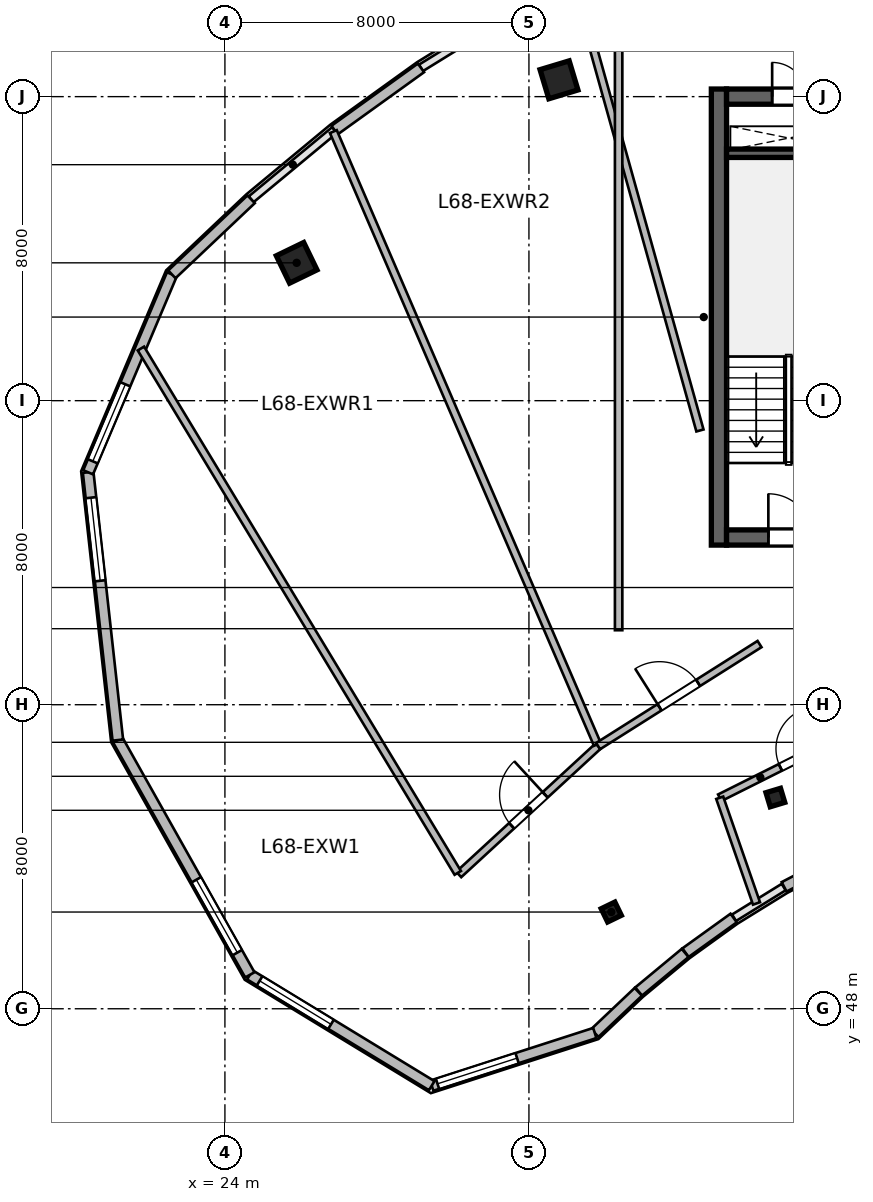
"""IFC4 building model, lengths in metres.
Left out: names, types, materials, properties, quantities, classifications, styles, units other than length and angle.
Written with IfcOpenShell. Run it as: python <this file> out.ifc"""

import sys

from ifc_helpers import new_model, si_unit, direction, frame, frame_2d, origin, origin_2d, place, context, subcontext, project, spatial, rectangle, i_section, extrude, source, transform, mapped, element, fill, save


model = new_model("IFC4")
c1 = context("Model", 3, precision=1e-05, world=origin(), true_north=direction((0.0, 1.0)))
c2 = subcontext(c1, "Body", "Model", "MODEL_VIEW")
j1 = project(units=[si_unit("LENGTHUNIT", "METRE"), si_unit("PLANEANGLEUNIT", "RADIAN")], contexts=[c1])
p1 = place(None, origin())
s1 = spatial("IfcSite", under=j1, at=p1, CompositionType="ELEMENT")
p2 = place(p1, origin())
s2 = spatial("IfcBuilding", under=s1, at=p2, CompositionType="ELEMENT")
p3 = place(p2, frame((0.0, 0.0, 279.6)))
s3 = spatial("IfcBuildingStorey", under=s2, at=p3, CompositionType="ELEMENT", Elevation=279.6)
m1 = source(origin(), c2, "Body", "SweptSolid", [
    extrude(rectangle(XDim=12.0, YDim=0.4, at=frame_2d((6.0, 0.0))), origin(), (0.0, 0.0, 1.0), 3.9),
])
p4 = place(p3, frame((37.0, 60.2, 0.0), z_axis=(0.0, 0.0, 1.0), x_axis=(0.0, 1.0, 0.0)))
e1 = element("IfcWall", 1, at=p4, inside=s3, PredefinedType="SHEAR", context=c2, shape_type="MappedRepresentation", body=[
    mapped(m1, transform((0.0, 0.0, 0.0), scale=1.0)),
])
m2 = source(origin(), c2, "Body", "SweptSolid", [
    extrude(rectangle(XDim=21.6, YDim=0.4, at=frame_2d((10.8, 0.0))), origin(), (0.0, 0.0, 1.0), 3.9),
])
p5 = place(p3, frame((37.2, 60.4, 0.0), z_axis=(0.0, 0.0, 1.0), x_axis=(1.0, 0.0, 0.0)))
e2 = element("IfcWall", 2, at=p5, inside=s3, PredefinedType="SHEAR", context=c2, shape_type="MappedRepresentation", body=[
    mapped(m2, transform((0.0, 0.0, 0.0), scale=1.0)),
])
p6 = place(p5, frame((1.1, 0.0, 0.0)))
e3 = element("IfcOpeningElement", 3, at=p6, cuts=e2, PredefinedType="OPENING", context=c2, shape_type="SweptSolid", body=[
    extrude(rectangle(XDim=1.15, YDim=2.15, at=frame_2d((0.575, 1.075))), frame((0.0, 0.21, 0.0), z_axis=(0.0, -1.0, 0.0), x_axis=(1.0, 0.0, 0.0)), (0.0, 0.0, 1.0), 0.42),
])
p7 = place(p5, frame((19.5, 0.0, 0.0)))
e4 = element("IfcOpeningElement", 4, at=p7, cuts=e2, PredefinedType="OPENING", context=c2, shape_type="SweptSolid", body=[
    extrude(rectangle(XDim=0.9, YDim=2.1, at=frame_2d((0.45, 1.05))), frame((0.0, 0.21, 0.0), z_axis=(0.0, -1.0, 0.0), x_axis=(1.0, 0.0, 0.0)), (0.0, 0.0, 1.0), 0.42),
])
p8 = place(p5, frame((12.02, 0.0, 0.0)))
e5 = element("IfcOpeningElement", 5, at=p8, cuts=e2, PredefinedType="OPENING", context=c2, shape_type="SweptSolid", body=[
    extrude(rectangle(XDim=1.6, YDim=2.15, at=frame_2d((0.8, 1.075))), frame((0.0, 0.21, 0.0), z_axis=(0.0, -1.0, 0.0), x_axis=(1.0, 0.0, 0.0)), (0.0, 0.0, 1.0), 0.42),
])
p9 = place(p3, frame((37.2, 72.0, 0.0), z_axis=(0.0, 0.0, 1.0), x_axis=(1.0, 0.0, 0.0)))
e6 = element("IfcWall", 6, at=p9, inside=s3, PredefinedType="SHEAR", context=c2, shape_type="MappedRepresentation", body=[
    mapped(m2, transform((0.0, 0.0, 0.0), scale=1.0)),
])
p10 = place(p9, frame((1.2, 0.0, 0.0)))
e7 = element("IfcOpeningElement", 7, at=p10, cuts=e6, PredefinedType="OPENING", context=c2, shape_type="SweptSolid", body=[
    extrude(rectangle(XDim=0.9, YDim=2.1, at=frame_2d((0.45, 1.05))), frame((0.0, 0.21, 0.0), z_axis=(0.0, -1.0, 0.0), x_axis=(1.0, 0.0, 0.0)), (0.0, 0.0, 1.0), 0.42),
])
p11 = place(p9, frame((14.7, 0.0, 0.0)))
e8 = element("IfcOpeningElement", 8, at=p11, cuts=e6, PredefinedType="OPENING", context=c2, shape_type="SweptSolid", body=[
    extrude(rectangle(XDim=1.2, YDim=2.15, at=frame_2d((0.6, 1.075))), frame((0.0, 0.21, 0.0), z_axis=(0.0, -1.0, 0.0), x_axis=(1.0, 0.0, 0.0)), (0.0, 0.0, 1.0), 0.42),
])
p12 = place(p9, frame((4.15, 0.0, 0.0)))
e9 = element("IfcOpeningElement", 9, at=p12, cuts=e6, PredefinedType="OPENING", context=c2, shape_type="SweptSolid", body=[
    extrude(rectangle(XDim=1.3, YDim=2.15, at=frame_2d((0.65, 1.075))), frame((0.0, 0.21, 0.0), z_axis=(0.0, -1.0, 0.0), x_axis=(1.0, 0.0, 0.0)), (0.0, 0.0, 1.0), 0.42),
])
p13 = place(p9, frame((7.25, 0.0, 0.0)))
e10 = element("IfcOpeningElement", 10, at=p13, cuts=e6, PredefinedType="OPENING", context=c2, shape_type="SweptSolid", body=[
    extrude(rectangle(XDim=0.9, YDim=2.1, at=frame_2d((0.45, 1.05))), frame((0.0, 0.21, 0.0), z_axis=(0.0, -1.0, 0.0), x_axis=(1.0, 0.0, 0.0)), (0.0, 0.0, 1.0), 0.42),
])
m3 = source(origin(), c2, "Body", "SweptSolid", [
    extrude(rectangle(XDim=3.27, YDim=0.22, at=frame_2d((1.635, 0.0))), origin(), (0.0, 0.0, 1.0), 3.9),
])
p14 = place(p3, frame((37.2, 70.51, 0.0), z_axis=(0.0, 0.0, 1.0), x_axis=(1.0, 0.0, 0.0)))
e11 = element("IfcWall", 11, at=p14, inside=s3, PredefinedType="SHEAR", context=c2, shape_type="MappedRepresentation", body=[
    mapped(m3, transform((0.0, 0.0, 0.0), scale=1.0)),
])
m4 = source(origin(), c2, "Body", "SweptSolid", [
    extrude(i_section(OverallWidth=0.399, OverallDepth=0.387, WebThickness=0.021, FlangeThickness=0.033, at=origin_2d()), origin(), (0.0, 0.0, 1.0), 3.9),
])
p15 = place(p3, frame((34.166, 50.545, 0.0), z_axis=(0.0, 0.0, 1.0), x_axis=(-0.436173672171, 0.899862504889, 0.0)))
e12 = element("IfcColumn", 12, at=p15, inside=s3, PredefinedType="COLUMN", context=c2, shape_type="MappedRepresentation", body=[
    mapped(m4, transform((0.0, 0.0, 0.0), scale=1.0)),
])
m5 = source(origin(), c2, "Body", "SweptSolid", [
    extrude(rectangle(XDim=0.8, YDim=0.8, at=origin_2d()), origin(), (0.0, 0.0, 1.0), 3.9),
])
p16 = place(p3, frame((25.888, 67.627, 0.0), z_axis=(0.0, 0.0, 1.0), x_axis=(-0.436173672171, 0.899862504889, 0.0)))
e13 = element("IfcColumn", 13, at=p16, inside=s3, PredefinedType="COLUMN", context=c2, shape_type="MappedRepresentation", body=[
    mapped(m5, transform((0.0, 0.0, 0.0), scale=1.0)),
])
p17 = place(p3, frame((38.485, 53.558, 0.0), z_axis=(0.0, 0.0, 1.0), x_axis=(-0.288697611798, 0.957420330337, 0.0)))
e14 = element("IfcColumn", 14, at=p17, inside=s3, PredefinedType="COLUMN", context=c2, shape_type="MappedRepresentation", body=[
    mapped(m4, transform((0.0, 0.0, 0.0), scale=1.0)),
])
p18 = place(p3, frame((32.791, 72.442, 0.0), z_axis=(0.0, 0.0, 1.0), x_axis=(-0.288697611798, 0.957420330337, 0.0)))
e15 = element("IfcColumn", 15, at=p18, inside=s3, PredefinedType="COLUMN", context=c2, shape_type="MappedRepresentation", body=[
    mapped(m5, transform((0.0, 0.0, 0.0), scale=1.0)),
])
m6 = source(origin(), c2, "Body", "SweptSolid", [
    extrude(rectangle(XDim=1.512, YDim=0.28, at=frame_2d((0.756, 0.0))), origin(), (0.0, 0.0, 1.0), 3.64),
])
p19 = place(p3, frame((40.056, 51.906, 0.0), z_axis=(0.0, 0.0, 1.0), x_axis=(-0.886841011195, -0.462074691865, 0.0)))
e16 = element("IfcWall", 16, at=p19, inside=s3, PredefinedType="SOLIDWALL", context=c2, shape_type="MappedRepresentation", body=[
    mapped(m6, transform((0.0, 0.0, 0.0), scale=1.0)),
])
m7 = source(origin(), c2, "Body", "SweptSolid", [
    extrude(rectangle(XDim=1.561, YDim=0.28, at=frame_2d((0.781, 0.0))), origin(), (0.0, 0.0, 1.0), 3.64),
])
p20 = place(p3, frame((37.387, 50.387, 0.0), z_axis=(0.0, 0.0, 1.0), x_axis=(-0.81154027425, -0.584296485758, 0.0)))
e17 = element("IfcWall", 17, at=p20, inside=s3, PredefinedType="SOLIDWALL", context=c2, shape_type="MappedRepresentation", body=[
    mapped(m7, transform((0.0, 0.0, 0.0), scale=1.0)),
])
m8 = source(origin(), c2, "Body", "SweptSolid", [
    extrude(rectangle(XDim=1.589, YDim=0.28, at=frame_2d((0.794, 0.0))), origin(), (0.0, 0.0, 1.0), 3.64),
])
p21 = place(p3, frame((36.11, 49.468, 0.0), z_axis=(0.0, 0.0, 1.0), x_axis=(-0.769805836273, -0.63827813251, 0.0)))
e18 = element("IfcWall", 18, at=p21, inside=s3, PredefinedType="SOLIDWALL", context=c2, shape_type="MappedRepresentation", body=[
    mapped(m8, transform((0.0, 0.0, 0.0), scale=1.0)),
])
m9 = source(origin(), c2, "Body", "SweptSolid", [
    extrude(rectangle(XDim=1.577, YDim=0.28, at=frame_2d((0.789, 0.0))), origin(), (0.0, 0.0, 1.0), 3.64),
])
p22 = place(p3, frame((34.878, 48.446, 0.0), z_axis=(0.0, 0.0, 1.0), x_axis=(-0.726119464467, -0.687568558998, 0.0)))
e19 = element("IfcWall", 19, at=p22, inside=s3, PredefinedType="SOLIDWALL", context=c2, shape_type="MappedRepresentation", body=[
    mapped(m9, transform((0.0, 0.0, 0.0), scale=1.0)),
])
m10 = source(origin(), c2, "Body", "SweptSolid", [
    extrude(rectangle(XDim=4.509, YDim=0.28, at=frame_2d((2.255, 0.0))), origin(), (0.0, 0.0, 1.0), 3.64),
])
p23 = place(p3, frame((33.733, 47.361, 0.0), z_axis=(0.0, 0.0, 1.0), x_axis=(-0.95162949292, -0.307247958828, 0.0)))
e20 = element("IfcWall", 20, at=p23, inside=s3, PredefinedType="SOLIDWALL", context=c2, shape_type="MappedRepresentation", body=[
    mapped(m10, transform((0.0, 0.0, 0.0), scale=1.0)),
])
p24 = place(p23, frame((2.149, 0.0, 0.95)))
e21 = element("IfcOpeningElement", 21, at=p24, cuts=e20, PredefinedType="OPENING", context=c2, shape_type="SweptSolid", body=[
    extrude(rectangle(XDim=2.2, YDim=2.1, at=frame_2d((1.1, 1.05))), frame((0.0, 0.15, 0.0), z_axis=(0.0, -1.0, 0.0), x_axis=(1.0, 0.0, 0.0)), (0.0, 0.0, 1.0), 0.3),
])
m11 = source(origin(), c2, "Body", "SweptSolid", [
    extrude(rectangle(XDim=5.604, YDim=0.28, at=frame_2d((2.802, 0.0))), origin(), (0.0, 0.0, 1.0), 3.64),
])
p25 = place(p3, frame((29.442, 45.976, 0.0), z_axis=(0.0, 0.0, 1.0), x_axis=(-0.854002492971, 0.520268913158, 0.0)))
e22 = element("IfcWall", 22, at=p25, inside=s3, PredefinedType="SOLIDWALL", context=c2, shape_type="MappedRepresentation", body=[
    mapped(m11, transform((0.0, 0.0, 0.0), scale=1.0)),
])
p26 = place(p25, frame((3.103, 0.0, 0.95)))
e23 = element("IfcOpeningElement", 23, at=p26, cuts=e22, PredefinedType="OPENING", context=c2, shape_type="SweptSolid", body=[
    extrude(rectangle(XDim=2.2, YDim=2.1, at=frame_2d((1.1, 1.05))), frame((0.0, 0.15, 0.0), z_axis=(0.0, -1.0, 0.0), x_axis=(1.0, 0.0, 0.0)), (0.0, 0.0, 1.0), 0.3),
])
m12 = source(origin(), c2, "Body", "SweptSolid", [
    extrude(rectangle(XDim=7.087, YDim=0.28, at=frame_2d((3.543, 0.0))), origin(), (0.0, 0.0, 1.0), 3.64),
])
p27 = place(p3, frame((24.656, 48.892, 0.0), z_axis=(0.0, 0.0, 1.0), x_axis=(-0.490158199368, 0.871633489256, 0.0)))
e24 = element("IfcWall", 24, at=p27, inside=s3, PredefinedType="SOLIDWALL", context=c2, shape_type="MappedRepresentation", body=[
    mapped(m12, transform((0.0, 0.0, 0.0), scale=1.0)),
])
p28 = place(p27, frame((0.672, 0.0, 0.95)))
e25 = element("IfcOpeningElement", 25, at=p28, cuts=e24, PredefinedType="OPENING", context=c2, shape_type="SweptSolid", body=[
    extrude(rectangle(XDim=2.2, YDim=2.1, at=frame_2d((1.1, 1.05))), frame((0.0, 0.15, 0.0), z_axis=(0.0, -1.0, 0.0), x_axis=(1.0, 0.0, 0.0)), (0.0, 0.0, 1.0), 0.3),
])
m13 = source(origin(), c2, "Body", "SweptSolid", [
    extrude(rectangle(XDim=7.09, YDim=0.28, at=frame_2d((3.545, 0.0))), origin(), (0.0, 0.0, 1.0), 3.64),
])
p29 = place(p3, frame((21.182, 55.069, 0.0), z_axis=(0.0, 0.0, 1.0), x_axis=(-0.110159396922, 0.993913933532, 0.0)))
e26 = element("IfcWall", 26, at=p29, inside=s3, PredefinedType="SOLIDWALL", context=c2, shape_type="MappedRepresentation", body=[
    mapped(m13, transform((0.0, 0.0, 0.0), scale=1.0)),
])
p30 = place(p29, frame((4.217, 0.0, 0.95)))
e27 = element("IfcOpeningElement", 27, at=p30, cuts=e26, PredefinedType="OPENING", context=c2, shape_type="SweptSolid", body=[
    extrude(rectangle(XDim=2.2, YDim=2.1, at=frame_2d((1.1, 1.05))), frame((0.0, 0.15, 0.0), z_axis=(0.0, -1.0, 0.0), x_axis=(1.0, 0.0, 0.0)), (0.0, 0.0, 1.0), 0.3),
])
m14 = source(origin(), c2, "Body", "SweptSolid", [
    extrude(rectangle(XDim=5.655, YDim=0.28, at=frame_2d((2.828, 0.0))), origin(), (0.0, 0.0, 1.0), 3.64),
])
p31 = place(p3, frame((20.401, 62.116, 0.0), z_axis=(0.0, 0.0, 1.0), x_axis=(0.389585063528, 0.920990487614, 0.0)))
e28 = element("IfcWall", 28, at=p31, inside=s3, PredefinedType="SOLIDWALL", context=c2, shape_type="MappedRepresentation", body=[
    mapped(m14, transform((0.0, 0.0, 0.0), scale=1.0)),
])
p32 = place(p31, frame((0.314, 0.0, 0.95)))
e29 = element("IfcOpeningElement", 29, at=p32, cuts=e28, PredefinedType="OPENING", context=c2, shape_type="SweptSolid", body=[
    extrude(rectangle(XDim=2.2, YDim=2.1, at=frame_2d((1.1, 1.05))), frame((0.0, 0.15, 0.0), z_axis=(0.0, -1.0, 0.0), x_axis=(1.0, 0.0, 0.0)), (0.0, 0.0, 1.0), 0.3),
])
m15 = source(origin(), c2, "Body", "SweptSolid", [
    extrude(rectangle(XDim=2.873, YDim=0.28, at=frame_2d((1.436, 0.0))), origin(), (0.0, 0.0, 1.0), 3.64),
])
p33 = place(p3, frame((22.604, 67.324, 0.0), z_axis=(0.0, 0.0, 1.0), x_axis=(0.72609560544, 0.687593754888, 0.0)))
e30 = element("IfcWall", 30, at=p33, inside=s3, PredefinedType="SOLIDWALL", context=c2, shape_type="MappedRepresentation", body=[
    mapped(m15, transform((0.0, 0.0, 0.0), scale=1.0)),
])
m16 = source(origin(), c2, "Body", "SweptSolid", [
    extrude(rectangle(XDim=2.802, YDim=0.28, at=frame_2d((1.401, 0.0))), origin(), (0.0, 0.0, 1.0), 3.64),
])
p34 = place(p3, frame((26.885, 71.12, 0.0), z_axis=(0.0, 0.0, 1.0), x_axis=(0.811507896482, 0.584341453217, 0.0)))
e31 = element("IfcWall", 31, at=p34, inside=s3, PredefinedType="SOLIDWALL", context=c2, shape_type="MappedRepresentation", body=[
    mapped(m16, transform((0.0, 0.0, 0.0), scale=1.0)),
])
m17 = source(origin(), c2, "Body", "SweptSolid", [
    extrude(rectangle(XDim=4.271, YDim=0.195, at=frame_2d((2.135, 0.0))), origin(), (0.0, 0.0, 1.0), 3.64),
])
p35 = place(p3, frame((37.021, 53.552, 0.0), z_axis=(0.0, 0.0, 1.0), x_axis=(0.894061035522, 0.447945158207, 0.0)))
e32 = element("IfcWall", 32, at=p35, inside=s3, PredefinedType="PARTITIONING", context=c2, shape_type="MappedRepresentation", body=[
    mapped(m17, transform((0.0, 0.0, 0.0), scale=1.0)),
])
p36 = place(p35, frame((1.785, 0.0, 0.0)))
e33 = element("IfcOpeningElement", 33, at=p36, cuts=e32, PredefinedType="OPENING", context=c2, shape_type="SweptSolid", body=[
    extrude(rectangle(XDim=1.1, YDim=2.15, at=frame_2d((0.55, 1.075))), frame((0.0, 0.107, 0.0), z_axis=(0.0, -1.0, 0.0), x_axis=(1.0, 0.0, 0.0)), (0.0, 0.0, 1.0), 0.215),
])
m18 = source(origin(), c2, "Body", "SweptSolid", [
    extrude(rectangle(XDim=2.944, YDim=0.195, at=frame_2d((1.472, 0.0))), origin(), (0.0, 0.0, 1.0), 3.64),
])
p37 = place(p3, frame((37.988, 50.771, 0.0), z_axis=(0.0, 0.0, 1.0), x_axis=(-0.328565655286, 0.944481132774, 0.0)))
e34 = element("IfcWall", 34, at=p37, inside=s3, PredefinedType="PARTITIONING", context=c2, shape_type="MappedRepresentation", body=[
    mapped(m18, transform((0.0, 0.0, 0.0), scale=1.0)),
])
m19 = source(origin(), c2, "Body", "SweptSolid", [
    extrude(rectangle(XDim=4.986, YDim=0.195, at=frame_2d((2.493, 0.0))), origin(), (0.0, 0.0, 1.0), 3.64),
])
p38 = place(p3, frame((30.153, 51.533, 0.0), z_axis=(0.0, 0.0, 1.0), x_axis=(0.735595190169, 0.677421372707, 0.0)))
e35 = element("IfcWall", 35, at=p38, inside=s3, PredefinedType="PARTITIONING", context=c2, shape_type="MappedRepresentation", body=[
    mapped(m19, transform((0.0, 0.0, 0.0), scale=1.0)),
])
p39 = place(p38, frame((1.893, 0.0, 0.0)))
e36 = element("IfcOpeningElement", 36, at=p39, cuts=e35, PredefinedType="OPENING", context=c2, shape_type="SweptSolid", body=[
    extrude(rectangle(XDim=1.2, YDim=2.15, at=frame_2d((0.6, 1.075))), frame((0.0, 0.107, 0.0), z_axis=(0.0, -1.0, 0.0), x_axis=(1.0, 0.0, 0.0)), (0.0, 0.0, 1.0), 0.215),
])
m20 = source(origin(), c2, "Body", "SweptSolid", [
    extrude(rectangle(XDim=16.121, YDim=0.195, at=frame_2d((8.061, 0.0))), origin(), (0.0, 0.0, 1.0), 3.64),
])
p40 = place(p3, frame((30.127, 51.575, 0.0), z_axis=(0.0, 0.0, 1.0), x_axis=(-0.517212483904, 0.855857024563, 0.0)))
e37 = element("IfcWall", 37, at=p40, inside=s3, PredefinedType="PARTITIONING", context=c2, shape_type="MappedRepresentation", body=[
    mapped(m20, transform((0.0, 0.0, 0.0), scale=1.0)),
])
m21 = source(origin(), c2, "Body", "SweptSolid", [
    extrude(rectangle(XDim=17.556, YDim=0.195, at=frame_2d((8.778, 0.0))), origin(), (0.0, 0.0, 1.0), 3.64),
])
p41 = place(p3, frame((33.8, 54.958, 0.0), z_axis=(0.0, 0.0, 1.0), x_axis=(-0.395687598313, 0.918385172213, 0.0)))
e38 = element("IfcWall", 38, at=p41, inside=s3, PredefinedType="PARTITIONING", context=c2, shape_type="MappedRepresentation", body=[
    mapped(m21, transform((0.0, 0.0, 0.0), scale=1.0)),
])
m22 = source(origin(), c2, "Body", "SweptSolid", [
    extrude(rectangle(XDim=5.025, YDim=0.195, at=frame_2d((2.513, 0.0))), origin(), (0.0, 0.0, 1.0), 3.64),
])
p42 = place(p3, frame((33.82, 54.911, 0.0), z_axis=(0.0, 0.0, 1.0), x_axis=(0.84532378062, 0.534254345717, 0.0)))
e39 = element("IfcWall", 39, at=p42, inside=s3, PredefinedType="PARTITIONING", context=c2, shape_type="MappedRepresentation", body=[
    mapped(m22, transform((0.0, 0.0, 0.0), scale=1.0)),
])
p43 = place(p42, frame((1.913, 0.0, 0.0)))
e40 = element("IfcOpeningElement", 40, at=p43, cuts=e39, PredefinedType="OPENING", context=c2, shape_type="SweptSolid", body=[
    extrude(rectangle(XDim=1.2, YDim=2.15, at=frame_2d((0.6, 1.075))), frame((0.0, 0.107, 0.0), z_axis=(0.0, -1.0, 0.0), x_axis=(1.0, 0.0, 0.0)), (0.0, 0.0, 1.0), 0.215),
])
m23 = source(origin(), c2, "Body", "SweptSolid", [
    extrude(rectangle(XDim=12.311, YDim=0.195, at=frame_2d((6.155, 0.0))), origin(), (0.0, 0.0, 1.0), 3.64),
])
p44 = place(p3, frame((36.5, 63.216, 0.0), z_axis=(0.0, 0.0, 1.0), x_axis=(-0.268759602651, 0.963207286093, 0.0)))
e41 = element("IfcWall", 41, at=p44, inside=s3, PredefinedType="PARTITIONING", context=c2, shape_type="MappedRepresentation", body=[
    mapped(m23, transform((0.0, 0.0, 0.0), scale=1.0)),
])
m24 = source(origin(), c2, "Body", "SweptSolid", [
    extrude(rectangle(XDim=17.681, YDim=0.195, at=frame_2d((8.84, 0.0))), origin(), (0.0, 0.0, 1.0), 3.64),
])
p45 = place(p3, frame((34.36, 57.96, 0.0), z_axis=(0.0, 0.0, 1.0), x_axis=(0.0, 1.0, 0.0)))
e42 = element("IfcWall", 42, at=p45, inside=s3, PredefinedType="PARTITIONING", context=c2, shape_type="MappedRepresentation", body=[
    mapped(m24, transform((0.0, 0.0, 0.0), scale=1.0)),
])
m25 = source(origin(), c2, "Body", "SweptSolid", [
    extrude(rectangle(XDim=2.2, YDim=2.1, at=frame_2d((1.1, 1.05))), frame((0.0, 0.03, 0.0), z_axis=(0.0, -1.0, 0.0), x_axis=(1.0, 0.0, 0.0)), (0.0, 0.0, 1.0), 0.06),
])
p46 = place(p24, origin())
e43 = element("IfcWindow", 43, at=p46, inside=s3, PartitioningType="TRIPLE_PANEL_VERTICAL", PredefinedType="WINDOW", context=c2, shape_type="MappedRepresentation", body=[
    mapped(m25, transform((0.0, 0.0, 0.0), scale=1.0)),
])
fill(e21, e43)
p47 = place(p26, origin())
e44 = element("IfcWindow", 44, at=p47, inside=s3, PartitioningType="TRIPLE_PANEL_VERTICAL", PredefinedType="WINDOW", context=c2, shape_type="MappedRepresentation", body=[
    mapped(m25, transform((0.0, 0.0, 0.0), scale=1.0)),
])
fill(e23, e44)
p48 = place(p28, origin())
e45 = element("IfcWindow", 45, at=p48, inside=s3, PartitioningType="TRIPLE_PANEL_VERTICAL", PredefinedType="WINDOW", context=c2, shape_type="MappedRepresentation", body=[
    mapped(m25, transform((0.0, 0.0, 0.0), scale=1.0)),
])
fill(e25, e45)
p49 = place(p30, origin())
e46 = element("IfcWindow", 46, at=p49, inside=s3, PartitioningType="TRIPLE_PANEL_VERTICAL", PredefinedType="WINDOW", context=c2, shape_type="MappedRepresentation", body=[
    mapped(m25, transform((0.0, 0.0, 0.0), scale=1.0)),
])
fill(e27, e46)
p50 = place(p32, origin())
e47 = element("IfcWindow", 47, at=p50, inside=s3, PartitioningType="TRIPLE_PANEL_VERTICAL", PredefinedType="WINDOW", context=c2, shape_type="MappedRepresentation", body=[
    mapped(m25, transform((0.0, 0.0, 0.0), scale=1.0)),
])
fill(e29, e47)
m26 = source(origin(), c2, "Body", "SweptSolid", [
    extrude(rectangle(XDim=1.15, YDim=2.15, at=frame_2d((0.575, 1.075))), frame((0.0, 0.025, 0.0), z_axis=(0.0, -1.0, 0.0), x_axis=(1.0, 0.0, 0.0)), (0.0, 0.0, 1.0), 0.05),
])
p51 = place(p6, origin())
e48 = element("IfcDoor", 48, at=p51, inside=s3, OperationType="SINGLE_SWING_LEFT", PredefinedType="DOOR", context=c2, shape_type="MappedRepresentation", body=[
    mapped(m26, transform((0.0, 0.0, 0.0), scale=1.0)),
])
fill(e3, e48)
m27 = source(origin(), c2, "Body", "SweptSolid", [
    extrude(rectangle(XDim=0.9, YDim=2.1, at=frame_2d((0.45, 1.05))), frame((0.0, 0.025, 0.0), z_axis=(0.0, -1.0, 0.0), x_axis=(1.0, 0.0, 0.0)), (0.0, 0.0, 1.0), 0.05),
])
p52 = place(p10, origin())
e49 = element("IfcDoor", 49, at=p52, inside=s3, OperationType="SINGLE_SWING_LEFT", PredefinedType="DOOR", context=c2, shape_type="MappedRepresentation", body=[
    mapped(m27, transform((0.0, 0.0, 0.0), scale=1.0)),
])
fill(e7, e49)
m28 = source(origin(), c2, "Body", "SweptSolid", [
    extrude(rectangle(XDim=1.1, YDim=2.15, at=frame_2d((0.55, 1.075))), frame((0.0, 0.025, 0.0), z_axis=(0.0, -1.0, 0.0), x_axis=(1.0, 0.0, 0.0)), (0.0, 0.0, 1.0), 0.05),
])
p53 = place(p36, origin())
e50 = element("IfcDoor", 50, at=p53, inside=s3, OperationType="SINGLE_SWING_RIGHT", PredefinedType="DOOR", context=c2, shape_type="MappedRepresentation", body=[
    mapped(m28, transform((0.0, 0.0, 0.0), scale=1.0)),
])
fill(e33, e50)
m29 = source(origin(), c2, "Body", "SweptSolid", [
    extrude(rectangle(XDim=1.2, YDim=2.15, at=frame_2d((0.6, 1.075))), frame((0.0, 0.025, 0.0), z_axis=(0.0, -1.0, 0.0), x_axis=(1.0, 0.0, 0.0)), (0.0, 0.0, 1.0), 0.05),
])
p54 = place(p39, origin())
e51 = element("IfcDoor", 51, at=p54, inside=s3, OperationType="SINGLE_SWING_RIGHT", PredefinedType="DOOR", context=c2, shape_type="MappedRepresentation", body=[
    mapped(m29, transform((0.0, 0.0, 0.0), scale=1.0)),
])
fill(e36, e51)
p55 = place(p43, origin())
e52 = element("IfcDoor", 52, at=p55, inside=s3, OperationType="SINGLE_SWING_LEFT", PredefinedType="DOOR", context=c2, shape_type="MappedRepresentation", body=[
    mapped(m29, transform((0.0, 0.0, 0.0), scale=1.0)),
])
fill(e40, e52)
save(model, sys.argv[1])
